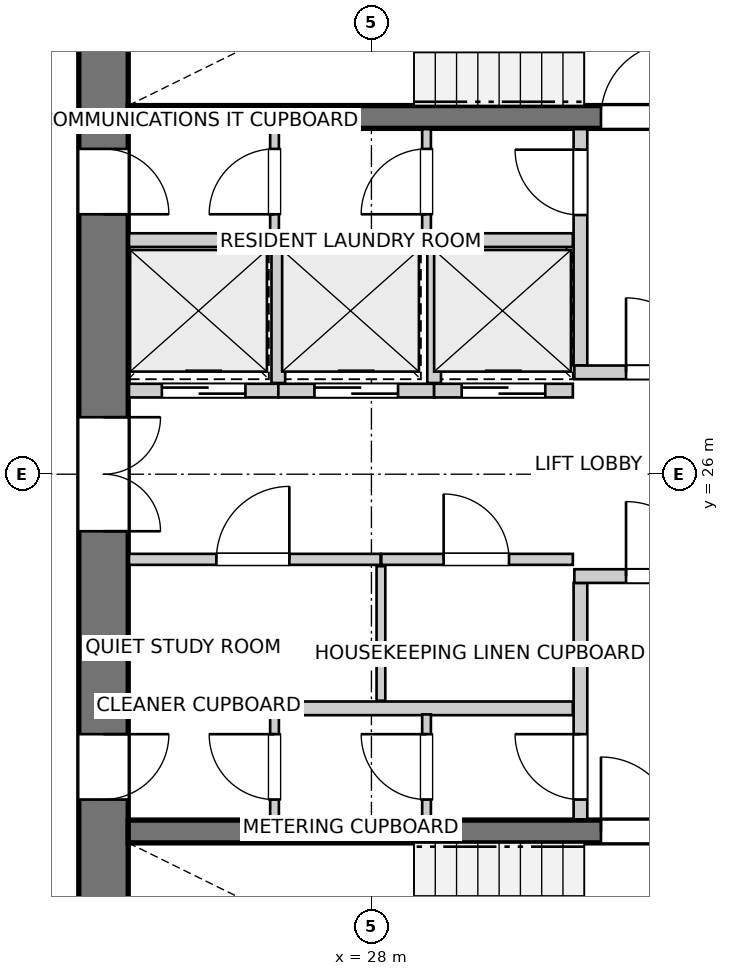
"""IFC4 building model, lengths in metres.
Left out: names, types, materials, properties, quantities, classifications, styles, units other than length and angle.
Written with IfcOpenShell. Run it as: python <this file> out.ifc"""

import sys

from ifc_helpers import new_model, si_unit, direction, frame, frame_2d, origin, place, context, subcontext, project, spatial, rectangle, extrude, source, transform, mapped, element, fill, save


model = new_model("IFC4")
c1 = context("Model", 3, precision=1e-05, world=origin(), true_north=direction((0.0, 1.0)))
c2 = subcontext(c1, "Body", "Model", "MODEL_VIEW")
j1 = project(units=[si_unit("LENGTHUNIT", "METRE"), si_unit("PLANEANGLEUNIT", "RADIAN")], contexts=[c1])
p1 = place(None, origin())
s1 = spatial("IfcSite", under=j1, at=p1, CompositionType="ELEMENT")
p2 = place(p1, origin())
s2 = spatial("IfcBuilding", under=s1, at=p2, CompositionType="ELEMENT")
p3 = place(p2, frame((0.0, 0.0, 181.0)))
s3 = spatial("IfcBuildingStorey", under=s2, at=p3, CompositionType="ELEMENT", Elevation=181.0)
p4 = place(p3, frame((24.475, 33.8, 0.0), z_axis=(0.0, 0.0, 1.0), x_axis=(0.0, -1.0, 0.0)))
e1 = element("IfcWall", 1, at=p4, inside=s3, PredefinedType="SHEAR", context=c2, shape_type="SweptSolid", body=[
    extrude(rectangle(XDim=15.6, YDim=0.65, at=frame_2d((7.8, 0.0))), origin(), (0.0, 0.0, 1.0), 2.95),
])
p5 = place(p4, frame((7.05, 0.0, 0.0)))
e2 = element("IfcOpeningElement", 2, at=p5, cuts=e1, PredefinedType="OPENING", context=c2, shape_type="SweptSolid", body=[
    extrude(rectangle(XDim=1.5, YDim=2.15, at=frame_2d((0.75, 1.075))), frame((0.0, 0.335, 0.0), z_axis=(0.0, -1.0, 0.0), x_axis=(1.0, 0.0, 0.0)), (0.0, 0.0, 1.0), 0.67),
])
p6 = place(p4, frame((3.52, 0.0, 0.0)))
e3 = element("IfcOpeningElement", 3, at=p6, cuts=e1, PredefinedType="OPENING", context=c2, shape_type="SweptSolid", body=[
    extrude(rectangle(XDim=0.86, YDim=2.05, at=frame_2d((0.43, 1.025))), frame((0.0, 0.335, 0.0), z_axis=(0.0, -1.0, 0.0), x_axis=(1.0, 0.0, 0.0)), (0.0, 0.0, 1.0), 0.67),
])
p7 = place(p4, frame((11.22, 0.0, 0.0)))
e4 = element("IfcOpeningElement", 4, at=p7, cuts=e1, PredefinedType="OPENING", context=c2, shape_type="SweptSolid", body=[
    extrude(rectangle(XDim=0.86, YDim=2.05, at=frame_2d((0.43, 1.025))), frame((0.0, 0.335, 0.0), z_axis=(0.0, -1.0, 0.0), x_axis=(1.0, 0.0, 0.0)), (0.0, 0.0, 1.0), 0.67),
])
p8 = place(p3, frame((24.8, 21.3, 0.0), z_axis=(0.0, 0.0, 1.0), x_axis=(1.0, 0.0, 0.0)))
e5 = element("IfcWall", 5, at=p8, inside=s3, PredefinedType="SHEAR", context=c2, shape_type="SweptSolid", body=[
    extrude(rectangle(XDim=11.1, YDim=0.3, at=frame_2d((5.55, 0.0))), origin(), (0.0, 0.0, 1.0), 2.95),
])
p9 = place(p8, frame((6.22, 0.0, 0.0)))
e6 = element("IfcOpeningElement", 6, at=p9, cuts=e5, PredefinedType="OPENING", context=c2, shape_type="SweptSolid", body=[
    extrude(rectangle(XDim=0.98, YDim=2.15, at=frame_2d((0.49, 1.075))), frame((0.0, 0.16, 0.0), z_axis=(0.0, -1.0, 0.0), x_axis=(1.0, 0.0, 0.0)), (0.0, 0.0, 1.0), 0.32),
])
p10 = place(p8, frame((9.15, 0.0, 0.0)))
e7 = element("IfcOpeningElement", 7, at=p10, cuts=e5, PredefinedType="OPENING", context=c2, shape_type="SweptSolid", body=[
    extrude(rectangle(XDim=1.15, YDim=2.15, at=frame_2d((0.575, 1.075))), frame((0.0, 0.16, 0.0), z_axis=(0.0, -1.0, 0.0), x_axis=(1.0, 0.0, 0.0)), (0.0, 0.0, 1.0), 0.32),
])
p11 = place(p3, frame((24.8, 30.7, 0.0), z_axis=(0.0, 0.0, 1.0), x_axis=(1.0, 0.0, 0.0)))
e8 = element("IfcWall", 8, at=p11, inside=s3, PredefinedType="SHEAR", context=c2, shape_type="SweptSolid", body=[
    extrude(rectangle(XDim=11.1, YDim=0.3, at=frame_2d((5.55, 0.0))), origin(), (0.0, 0.0, 1.0), 2.95),
])
p12 = place(p11, frame((6.22, 0.0, 0.0)))
e9 = element("IfcOpeningElement", 9, at=p12, cuts=e8, PredefinedType="OPENING", context=c2, shape_type="SweptSolid", body=[
    extrude(rectangle(XDim=0.98, YDim=2.15, at=frame_2d((0.49, 1.075))), frame((0.0, 0.16, 0.0), z_axis=(0.0, -1.0, 0.0), x_axis=(1.0, 0.0, 0.0)), (0.0, 0.0, 1.0), 0.32),
])
p13 = place(p11, frame((9.15, 0.0, 0.0)))
e10 = element("IfcOpeningElement", 10, at=p13, cuts=e8, PredefinedType="OPENING", context=c2, shape_type="SweptSolid", body=[
    extrude(rectangle(XDim=1.15, YDim=2.15, at=frame_2d((0.575, 1.075))), frame((0.0, 0.16, 0.0), z_axis=(0.0, -1.0, 0.0), x_axis=(1.0, 0.0, 0.0)), (0.0, 0.0, 1.0), 0.32),
])
p14 = place(p3, frame((30.75, 21.46, 0.0), z_axis=(0.0, 0.0, 1.0), x_axis=(0.0, 1.0, 0.0)))
e11 = element("IfcWall", 11, at=p14, inside=s3, PredefinedType="PARTITIONING", context=c2, shape_type="SweptSolid", body=[
    extrude(rectangle(XDim=3.11, YDim=0.18, at=frame_2d((1.555, 0.0))), origin(), (0.0, 0.0, 1.0), 2.95),
])
p15 = place(p14, frame((0.26, 0.0, 0.0)))
e12 = element("IfcOpeningElement", 12, at=p15, cuts=e11, PredefinedType="OPENING", context=c2, shape_type="SweptSolid", body=[
    extrude(rectangle(XDim=0.86, YDim=2.05, at=frame_2d((0.43, 1.025))), frame((0.0, 0.1, 0.0), z_axis=(0.0, -1.0, 0.0), x_axis=(1.0, 0.0, 0.0)), (0.0, 0.0, 1.0), 0.2),
])
p16 = place(p3, frame((30.67, 24.66, 0.0), z_axis=(0.0, 0.0, 1.0), x_axis=(1.0, 0.0, 0.0)))
e13 = element("IfcWall", 13, at=p16, inside=s3, PredefinedType="PARTITIONING", context=c2, shape_type="SweptSolid", body=[
    extrude(rectangle(XDim=5.22, YDim=0.18, at=frame_2d((2.61, 0.0))), origin(), (0.0, 0.0, 1.0), 2.95),
])
p17 = place(p16, frame((0.68, 0.0, 0.0)))
e14 = element("IfcOpeningElement", 14, at=p17, cuts=e13, PredefinedType="OPENING", context=c2, shape_type="SweptSolid", body=[
    extrude(rectangle(XDim=0.98, YDim=2.15, at=frame_2d((0.49, 1.075))), frame((0.0, 0.1, 0.0), z_axis=(0.0, -1.0, 0.0), x_axis=(1.0, 0.0, 0.0)), (0.0, 0.0, 1.0), 0.2),
])
p18 = place(p3, frame((30.75, 27.43, 0.0), z_axis=(0.0, 0.0, 1.0), x_axis=(0.0, 1.0, 0.0)))
e15 = element("IfcWall", 15, at=p18, inside=s3, PredefinedType="PARTITIONING", context=c2, shape_type="SweptSolid", body=[
    extrude(rectangle(XDim=3.11, YDim=0.18, at=frame_2d((1.555, 0.0))), origin(), (0.0, 0.0, 1.0), 2.95),
])
p19 = place(p18, frame((1.98, 0.0, 0.0)))
e16 = element("IfcOpeningElement", 16, at=p19, cuts=e15, PredefinedType="OPENING", context=c2, shape_type="SweptSolid", body=[
    extrude(rectangle(XDim=0.86, YDim=2.05, at=frame_2d((0.43, 1.025))), frame((0.0, 0.1, 0.0), z_axis=(0.0, -1.0, 0.0), x_axis=(1.0, 0.0, 0.0)), (0.0, 0.0, 1.0), 0.2),
])
p20 = place(p3, frame((30.67, 27.34, 0.0), z_axis=(0.0, 0.0, 1.0), x_axis=(1.0, 0.0, 0.0)))
e17 = element("IfcWall", 17, at=p20, inside=s3, PredefinedType="PARTITIONING", context=c2, shape_type="SweptSolid", body=[
    extrude(rectangle(XDim=5.22, YDim=0.18, at=frame_2d((2.61, 0.0))), origin(), (0.0, 0.0, 1.0), 2.95),
])
p21 = place(p20, frame((0.68, 0.0, 0.0)))
e18 = element("IfcOpeningElement", 18, at=p21, cuts=e17, PredefinedType="OPENING", context=c2, shape_type="SweptSolid", body=[
    extrude(rectangle(XDim=0.98, YDim=2.15, at=frame_2d((0.49, 1.075))), frame((0.0, 0.1, 0.0), z_axis=(0.0, -1.0, 0.0), x_axis=(1.0, 0.0, 0.0)), (0.0, 0.0, 1.0), 0.2),
])
p22 = place(p3, frame((24.81, 22.92, 0.0), z_axis=(0.0, 0.0, 1.0), x_axis=(1.0, 0.0, 0.0)))
e19 = element("IfcWall", 19, at=p22, inside=s3, PredefinedType="PARTITIONING", context=c2, shape_type="SweptSolid", body=[
    extrude(rectangle(XDim=5.84, YDim=0.18, at=frame_2d((2.92, 0.0))), origin(), (0.0, 0.0, 1.0), 2.95),
])
p23 = place(p3, frame((24.81, 24.88, 0.0), z_axis=(0.0, 0.0, 1.0), x_axis=(1.0, 0.0, 0.0)))
e20 = element("IfcWall", 20, at=p23, inside=s3, PredefinedType="PARTITIONING", context=c2, shape_type="SweptSolid", body=[
    extrude(rectangle(XDim=3.31, YDim=0.145, at=frame_2d((1.655, 0.0))), origin(), (0.0, 0.0, 1.0), 2.95),
])
p24 = place(p23, frame((1.15, 0.0, 0.0)))
e21 = element("IfcOpeningElement", 21, at=p24, cuts=e20, PredefinedType="OPENING", context=c2, shape_type="SweptSolid", body=[
    extrude(rectangle(XDim=0.96, YDim=2.1, at=frame_2d((0.48, 1.05))), frame((0.0, 0.083, 0.0), z_axis=(0.0, -1.0, 0.0), x_axis=(1.0, 0.0, 0.0)), (0.0, 0.0, 1.0), 0.165),
])
p25 = place(p3, frame((28.13, 24.88, 0.0), z_axis=(0.0, 0.0, 1.0), x_axis=(1.0, 0.0, 0.0)))
e22 = element("IfcWall", 22, at=p25, inside=s3, PredefinedType="PARTITIONING", context=c2, shape_type="SweptSolid", body=[
    extrude(rectangle(XDim=2.52, YDim=0.145, at=frame_2d((1.26, 0.0))), origin(), (0.0, 0.0, 1.0), 2.95),
])
p26 = place(p25, frame((0.82, 0.0, 0.0)))
e23 = element("IfcOpeningElement", 23, at=p26, cuts=e22, PredefinedType="OPENING", context=c2, shape_type="SweptSolid", body=[
    extrude(rectangle(XDim=0.86, YDim=2.05, at=frame_2d((0.43, 1.025))), frame((0.0, 0.083, 0.0), z_axis=(0.0, -1.0, 0.0), x_axis=(1.0, 0.0, 0.0)), (0.0, 0.0, 1.0), 0.165),
])
p27 = place(p3, frame((28.125, 23.02, 0.0), z_axis=(0.0, 0.0, 1.0), x_axis=(0.0, 1.0, 0.0)))
e24 = element("IfcWall", 24, at=p27, inside=s3, PredefinedType="PARTITIONING", context=c2, shape_type="SweptSolid", body=[
    extrude(rectangle(XDim=1.77, YDim=0.115, at=frame_2d((0.885, 0.0))), origin(), (0.0, 0.0, 1.0), 2.95),
])
p28 = place(p3, frame((24.81, 29.08, 0.0), z_axis=(0.0, 0.0, 1.0), x_axis=(1.0, 0.0, 0.0)))
e25 = element("IfcWall", 25, at=p28, inside=s3, PredefinedType="PARTITIONING", context=c2, shape_type="SweptSolid", body=[
    extrude(rectangle(XDim=5.84, YDim=0.18, at=frame_2d((2.92, 0.0))), origin(), (0.0, 0.0, 1.0), 2.95),
])
p29 = place(p3, frame((24.81, 27.1, 0.0), z_axis=(0.0, 0.0, 1.0), x_axis=(1.0, 0.0, 0.0)))
e26 = element("IfcWall", 26, at=p29, inside=s3, PredefinedType="PARTITIONING", context=c2, shape_type="SweptSolid", body=[
    extrude(rectangle(XDim=1.965, YDim=0.18, at=frame_2d((0.982, 0.0))), origin(), (0.0, 0.0, 1.0), 2.95),
])
p30 = place(p29, frame((0.433, 0.0, 0.0)))
e27 = element("IfcOpeningElement", 27, at=p30, cuts=e26, PredefinedType="OPENING", context=c2, shape_type="SweptSolid", body=[
    extrude(rectangle(XDim=1.1, YDim=2.15, at=frame_2d((0.55, 1.075))), frame((0.0, 0.1, 0.0), z_axis=(0.0, -1.0, 0.0), x_axis=(1.0, 0.0, 0.0)), (0.0, 0.0, 1.0), 0.2),
])
p31 = place(p3, frame((26.775, 27.1, 0.0), z_axis=(0.0, 0.0, 1.0), x_axis=(1.0, 0.0, 0.0)))
e28 = element("IfcWall", 28, at=p31, inside=s3, PredefinedType="PARTITIONING", context=c2, shape_type="SweptSolid", body=[
    extrude(rectangle(XDim=2.05, YDim=0.18, at=frame_2d((1.025, 0.0))), origin(), (0.0, 0.0, 1.0), 2.95),
])
p32 = place(p31, frame((0.475, 0.0, 0.0)))
e29 = element("IfcOpeningElement", 29, at=p32, cuts=e28, PredefinedType="OPENING", context=c2, shape_type="SweptSolid", body=[
    extrude(rectangle(XDim=1.1, YDim=2.15, at=frame_2d((0.55, 1.075))), frame((0.0, 0.1, 0.0), z_axis=(0.0, -1.0, 0.0), x_axis=(1.0, 0.0, 0.0)), (0.0, 0.0, 1.0), 0.2),
])
p33 = place(p3, frame((26.775, 27.2, 0.0), z_axis=(0.0, 0.0, 1.0), x_axis=(0.0, 1.0, 0.0)))
e30 = element("IfcWall", 30, at=p33, inside=s3, PredefinedType="PARTITIONING", context=c2, shape_type="SweptSolid", body=[
    extrude(rectangle(XDim=1.78, YDim=0.18, at=frame_2d((0.89, 0.0))), origin(), (0.0, 0.0, 1.0), 2.95),
])
p34 = place(p3, frame((28.825, 27.1, 0.0), z_axis=(0.0, 0.0, 1.0), x_axis=(1.0, 0.0, 0.0)))
e31 = element("IfcWall", 31, at=p34, inside=s3, PredefinedType="PARTITIONING", context=c2, shape_type="SweptSolid", body=[
    extrude(rectangle(XDim=1.825, YDim=0.18, at=frame_2d((0.913, 0.0))), origin(), (0.0, 0.0, 1.0), 2.95),
])
p35 = place(p34, frame((0.363, 0.0, 0.0)))
e32 = element("IfcOpeningElement", 32, at=p35, cuts=e31, PredefinedType="OPENING", context=c2, shape_type="SweptSolid", body=[
    extrude(rectangle(XDim=1.1, YDim=2.15, at=frame_2d((0.55, 1.075))), frame((0.0, 0.1, 0.0), z_axis=(0.0, -1.0, 0.0), x_axis=(1.0, 0.0, 0.0)), (0.0, 0.0, 1.0), 0.2),
])
p36 = place(p3, frame((28.825, 27.2, 0.0), z_axis=(0.0, 0.0, 1.0), x_axis=(0.0, 1.0, 0.0)))
e33 = element("IfcWall", 33, at=p36, inside=s3, PredefinedType="PARTITIONING", context=c2, shape_type="SweptSolid", body=[
    extrude(rectangle(XDim=1.78, YDim=0.18, at=frame_2d((0.89, 0.0))), origin(), (0.0, 0.0, 1.0), 2.95),
])
p37 = place(p3, frame((26.725, 21.46, 0.0), z_axis=(0.0, 0.0, 1.0), x_axis=(0.0, 1.0, 0.0)))
e34 = element("IfcWall", 34, at=p37, inside=s3, PredefinedType="PARTITIONING", context=c2, shape_type="SweptSolid", body=[
    extrude(rectangle(XDim=1.38, YDim=0.115, at=frame_2d((0.69, 0.0))), origin(), (0.0, 0.0, 1.0), 2.95),
])
p38 = place(p37, frame((0.26, 0.0, 0.0)))
e35 = element("IfcOpeningElement", 35, at=p38, cuts=e34, PredefinedType="OPENING", context=c2, shape_type="SweptSolid", body=[
    extrude(rectangle(XDim=0.86, YDim=2.05, at=frame_2d((0.43, 1.025))), frame((0.0, 0.067, 0.0), z_axis=(0.0, -1.0, 0.0), x_axis=(1.0, 0.0, 0.0)), (0.0, 0.0, 1.0), 0.135),
])
p39 = place(p3, frame((26.725, 29.16, 0.0), z_axis=(0.0, 0.0, 1.0), x_axis=(0.0, 1.0, 0.0)))
e36 = element("IfcWall", 36, at=p39, inside=s3, PredefinedType="PARTITIONING", context=c2, shape_type="SweptSolid", body=[
    extrude(rectangle(XDim=1.38, YDim=0.115, at=frame_2d((0.69, 0.0))), origin(), (0.0, 0.0, 1.0), 2.95),
])
p40 = place(p39, frame((0.26, 0.0, 0.0)))
e37 = element("IfcOpeningElement", 37, at=p40, cuts=e36, PredefinedType="OPENING", context=c2, shape_type="SweptSolid", body=[
    extrude(rectangle(XDim=0.86, YDim=2.05, at=frame_2d((0.43, 1.025))), frame((0.0, 0.067, 0.0), z_axis=(0.0, -1.0, 0.0), x_axis=(1.0, 0.0, 0.0)), (0.0, 0.0, 1.0), 0.135),
])
p41 = place(p3, frame((28.725, 21.46, 0.0), z_axis=(0.0, 0.0, 1.0), x_axis=(0.0, 1.0, 0.0)))
e38 = element("IfcWall", 38, at=p41, inside=s3, PredefinedType="PARTITIONING", context=c2, shape_type="SweptSolid", body=[
    extrude(rectangle(XDim=1.38, YDim=0.115, at=frame_2d((0.69, 0.0))), origin(), (0.0, 0.0, 1.0), 2.95),
])
p42 = place(p41, frame((0.26, 0.0, 0.0)))
e39 = element("IfcOpeningElement", 39, at=p42, cuts=e38, PredefinedType="OPENING", context=c2, shape_type="SweptSolid", body=[
    extrude(rectangle(XDim=0.86, YDim=2.05, at=frame_2d((0.43, 1.025))), frame((0.0, 0.067, 0.0), z_axis=(0.0, -1.0, 0.0), x_axis=(1.0, 0.0, 0.0)), (0.0, 0.0, 1.0), 0.135),
])
p43 = place(p3, frame((28.725, 29.16, 0.0), z_axis=(0.0, 0.0, 1.0), x_axis=(0.0, 1.0, 0.0)))
e40 = element("IfcWall", 40, at=p43, inside=s3, PredefinedType="PARTITIONING", context=c2, shape_type="SweptSolid", body=[
    extrude(rectangle(XDim=1.38, YDim=0.115, at=frame_2d((0.69, 0.0))), origin(), (0.0, 0.0, 1.0), 2.95),
])
p44 = place(p43, frame((0.26, 0.0, 0.0)))
e41 = element("IfcOpeningElement", 41, at=p44, cuts=e40, PredefinedType="OPENING", context=c2, shape_type="SweptSolid", body=[
    extrude(rectangle(XDim=0.86, YDim=2.05, at=frame_2d((0.43, 1.025))), frame((0.0, 0.067, 0.0), z_axis=(0.0, -1.0, 0.0), x_axis=(1.0, 0.0, 0.0)), (0.0, 0.0, 1.0), 0.135),
])
m1 = source(origin(), c2, "Body", "SweptSolid", [
    extrude(rectangle(XDim=0.98, YDim=2.15, at=frame_2d((0.49, 1.075))), frame((0.0, 0.025, 0.0), z_axis=(0.0, -1.0, 0.0), x_axis=(1.0, 0.0, 0.0)), (0.0, 0.0, 1.0), 0.05),
])
p45 = place(p9, origin())
e42 = element("IfcDoor", 42, at=p45, inside=s3, OperationType="SINGLE_SWING_LEFT", PredefinedType="DOOR", context=c2, shape_type="MappedRepresentation", body=[
    mapped(m1, transform((0.0, 0.0, 0.0), x_axis=(1.0, 0.0, 0.0), y_axis=(0.0, 1.0, 0.0), z_axis=(0.0, 0.0, 1.0), scale=1.0)),
])
fill(e6, e42)
p46 = place(p12, origin())
e43 = element("IfcDoor", 43, at=p46, inside=s3, OperationType="SINGLE_SWING_RIGHT", PredefinedType="DOOR", context=c2, shape_type="MappedRepresentation", body=[
    mapped(m1, transform((0.0, 0.0, 0.0), x_axis=(1.0, 0.0, 0.0), y_axis=(0.0, 1.0, 0.0), z_axis=(0.0, 0.0, 1.0), scale=1.0)),
])
fill(e9, e43)
m2 = source(origin(), c2, "Body", "SweptSolid", [
    extrude(rectangle(XDim=1.5, YDim=2.15, at=frame_2d((0.75, 1.075))), frame((0.0, 0.025, 0.0), z_axis=(0.0, -1.0, 0.0), x_axis=(1.0, 0.0, 0.0)), (0.0, 0.0, 1.0), 0.05),
])
p47 = place(p5, origin())
e44 = element("IfcDoor", 44, at=p47, inside=s3, OperationType="DOUBLE_DOOR_SINGLE_SWING", PredefinedType="DOOR", context=c2, shape_type="MappedRepresentation", body=[
    mapped(m2, transform((0.0, 0.0, 0.0), x_axis=(1.0, 0.0, 0.0), y_axis=(0.0, 1.0, 0.0), z_axis=(0.0, 0.0, 1.0), scale=1.0)),
])
fill(e2, e44)
m3 = source(origin(), c2, "Body", "SweptSolid", [
    extrude(rectangle(XDim=0.86, YDim=2.05, at=frame_2d((0.43, 1.025))), frame((0.0, 0.025, 0.0), z_axis=(0.0, -1.0, 0.0), x_axis=(1.0, 0.0, 0.0)), (0.0, 0.0, 1.0), 0.05),
])
p48 = place(p6, origin())
e45 = element("IfcDoor", 45, at=p48, inside=s3, OperationType="SINGLE_SWING_RIGHT", PredefinedType="DOOR", context=c2, shape_type="MappedRepresentation", body=[
    mapped(m3, transform((0.0, 0.0, 0.0), x_axis=(1.0, 0.0, 0.0), y_axis=(0.0, 1.0, 0.0), z_axis=(0.0, 0.0, 1.0), scale=1.0)),
])
fill(e3, e45)
p49 = place(p7, origin())
e46 = element("IfcDoor", 46, at=p49, inside=s3, OperationType="SINGLE_SWING_LEFT", PredefinedType="DOOR", context=c2, shape_type="MappedRepresentation", body=[
    mapped(m3, transform((0.0, 0.0, 0.0), x_axis=(1.0, 0.0, 0.0), y_axis=(0.0, 1.0, 0.0), z_axis=(0.0, 0.0, 1.0), scale=1.0)),
])
fill(e4, e46)
p50 = place(p15, origin())
e47 = element("IfcDoor", 47, at=p50, inside=s3, OperationType="SINGLE_SWING_RIGHT", PredefinedType="DOOR", context=c2, shape_type="MappedRepresentation", body=[
    mapped(m3, transform((0.0, 0.0, 0.0), x_axis=(1.0, 0.0, 0.0), y_axis=(0.0, 1.0, 0.0), z_axis=(0.0, 0.0, 1.0), scale=1.0)),
])
fill(e12, e47)
p51 = place(p17, origin())
e48 = element("IfcDoor", 48, at=p51, inside=s3, OperationType="SINGLE_SWING_LEFT", PredefinedType="DOOR", context=c2, shape_type="MappedRepresentation", body=[
    mapped(m1, transform((0.0, 0.0, 0.0), x_axis=(1.0, 0.0, 0.0), y_axis=(0.0, 1.0, 0.0), z_axis=(0.0, 0.0, 1.0), scale=1.0)),
])
fill(e14, e48)
p52 = place(p19, origin())
e49 = element("IfcDoor", 49, at=p52, inside=s3, OperationType="SINGLE_SWING_RIGHT", PredefinedType="DOOR", context=c2, shape_type="MappedRepresentation", body=[
    mapped(m3, transform((0.0, 0.0, 0.0), x_axis=(1.0, 0.0, 0.0), y_axis=(0.0, 1.0, 0.0), z_axis=(0.0, 0.0, 1.0), scale=1.0)),
])
fill(e16, e49)
p53 = place(p21, origin())
e50 = element("IfcDoor", 50, at=p53, inside=s3, OperationType="SINGLE_SWING_LEFT", PredefinedType="DOOR", context=c2, shape_type="MappedRepresentation", body=[
    mapped(m1, transform((0.0, 0.0, 0.0), x_axis=(1.0, 0.0, 0.0), y_axis=(0.0, 1.0, 0.0), z_axis=(0.0, 0.0, 1.0), scale=1.0)),
])
fill(e18, e50)
m4 = source(origin(), c2, "Body", "SweptSolid", [
    extrude(rectangle(XDim=0.96, YDim=2.1, at=frame_2d((0.48, 1.05))), frame((0.0, 0.025, 0.0), z_axis=(0.0, -1.0, 0.0), x_axis=(1.0, 0.0, 0.0)), (0.0, 0.0, 1.0), 0.05),
])
p54 = place(p24, origin())
e51 = element("IfcDoor", 51, at=p54, inside=s3, OperationType="SINGLE_SWING_RIGHT", PredefinedType="DOOR", context=c2, shape_type="MappedRepresentation", body=[
    mapped(m4, transform((0.0, 0.0, 0.0), x_axis=(1.0, 0.0, 0.0), y_axis=(0.0, 1.0, 0.0), z_axis=(0.0, 0.0, 1.0), scale=1.0)),
])
fill(e21, e51)
p55 = place(p26, origin())
e52 = element("IfcDoor", 52, at=p55, inside=s3, OperationType="SINGLE_SWING_LEFT", PredefinedType="DOOR", context=c2, shape_type="MappedRepresentation", body=[
    mapped(m3, transform((0.0, 0.0, 0.0), x_axis=(1.0, 0.0, 0.0), y_axis=(0.0, 1.0, 0.0), z_axis=(0.0, 0.0, 1.0), scale=1.0)),
])
fill(e23, e52)
m5 = source(origin(), c2, "Body", "SweptSolid", [
    extrude(rectangle(XDim=1.1, YDim=2.15, at=frame_2d((0.55, 1.075))), frame((0.0, 0.025, 0.0), z_axis=(0.0, -1.0, 0.0), x_axis=(1.0, 0.0, 0.0)), (0.0, 0.0, 1.0), 0.05),
])
p56 = place(p30, origin())
e53 = element("IfcDoor", 53, at=p56, inside=s3, OperationType="DOUBLE_DOOR_SLIDING", PredefinedType="DOOR", context=c2, shape_type="MappedRepresentation", body=[
    mapped(m5, transform((0.0, 0.0, 0.0), x_axis=(1.0, 0.0, 0.0), y_axis=(0.0, 1.0, 0.0), z_axis=(0.0, 0.0, 1.0), scale=1.0)),
])
fill(e27, e53)
p57 = place(p32, origin())
e54 = element("IfcDoor", 54, at=p57, inside=s3, OperationType="DOUBLE_DOOR_SLIDING", PredefinedType="DOOR", context=c2, shape_type="MappedRepresentation", body=[
    mapped(m5, transform((0.0, 0.0, 0.0), x_axis=(1.0, 0.0, 0.0), y_axis=(0.0, 1.0, 0.0), z_axis=(0.0, 0.0, 1.0), scale=1.0)),
])
fill(e29, e54)
p58 = place(p35, origin())
e55 = element("IfcDoor", 55, at=p58, inside=s3, OperationType="DOUBLE_DOOR_SLIDING", PredefinedType="DOOR", context=c2, shape_type="MappedRepresentation", body=[
    mapped(m5, transform((0.0, 0.0, 0.0), x_axis=(1.0, 0.0, 0.0), y_axis=(0.0, 1.0, 0.0), z_axis=(0.0, 0.0, 1.0), scale=1.0)),
])
fill(e32, e55)
p59 = place(p38, origin())
e56 = element("IfcDoor", 56, at=p59, inside=s3, OperationType="SINGLE_SWING_RIGHT", PredefinedType="DOOR", context=c2, shape_type="MappedRepresentation", body=[
    mapped(m3, transform((0.0, 0.0, 0.0), x_axis=(1.0, 0.0, 0.0), y_axis=(0.0, 1.0, 0.0), z_axis=(0.0, 0.0, 1.0), scale=1.0)),
])
fill(e35, e56)
p60 = place(p40, origin())
e57 = element("IfcDoor", 57, at=p60, inside=s3, OperationType="SINGLE_SWING_LEFT", PredefinedType="DOOR", context=c2, shape_type="MappedRepresentation", body=[
    mapped(m3, transform((0.0, 0.0, 0.0), x_axis=(1.0, 0.0, 0.0), y_axis=(0.0, 1.0, 0.0), z_axis=(0.0, 0.0, 1.0), scale=1.0)),
])
fill(e37, e57)
p61 = place(p42, origin())
e58 = element("IfcDoor", 58, at=p61, inside=s3, OperationType="SINGLE_SWING_RIGHT", PredefinedType="DOOR", context=c2, shape_type="MappedRepresentation", body=[
    mapped(m3, transform((0.0, 0.0, 0.0), x_axis=(1.0, 0.0, 0.0), y_axis=(0.0, 1.0, 0.0), z_axis=(0.0, 0.0, 1.0), scale=1.0)),
])
fill(e39, e58)
p62 = place(p44, origin())
e59 = element("IfcDoor", 59, at=p62, inside=s3, OperationType="SINGLE_SWING_LEFT", PredefinedType="DOOR", context=c2, shape_type="MappedRepresentation", body=[
    mapped(m3, transform((0.0, 0.0, 0.0), x_axis=(1.0, 0.0, 0.0), y_axis=(0.0, 1.0, 0.0), z_axis=(0.0, 0.0, 1.0), scale=1.0)),
])
fill(e41, e59)
save(model, sys.argv[1])
